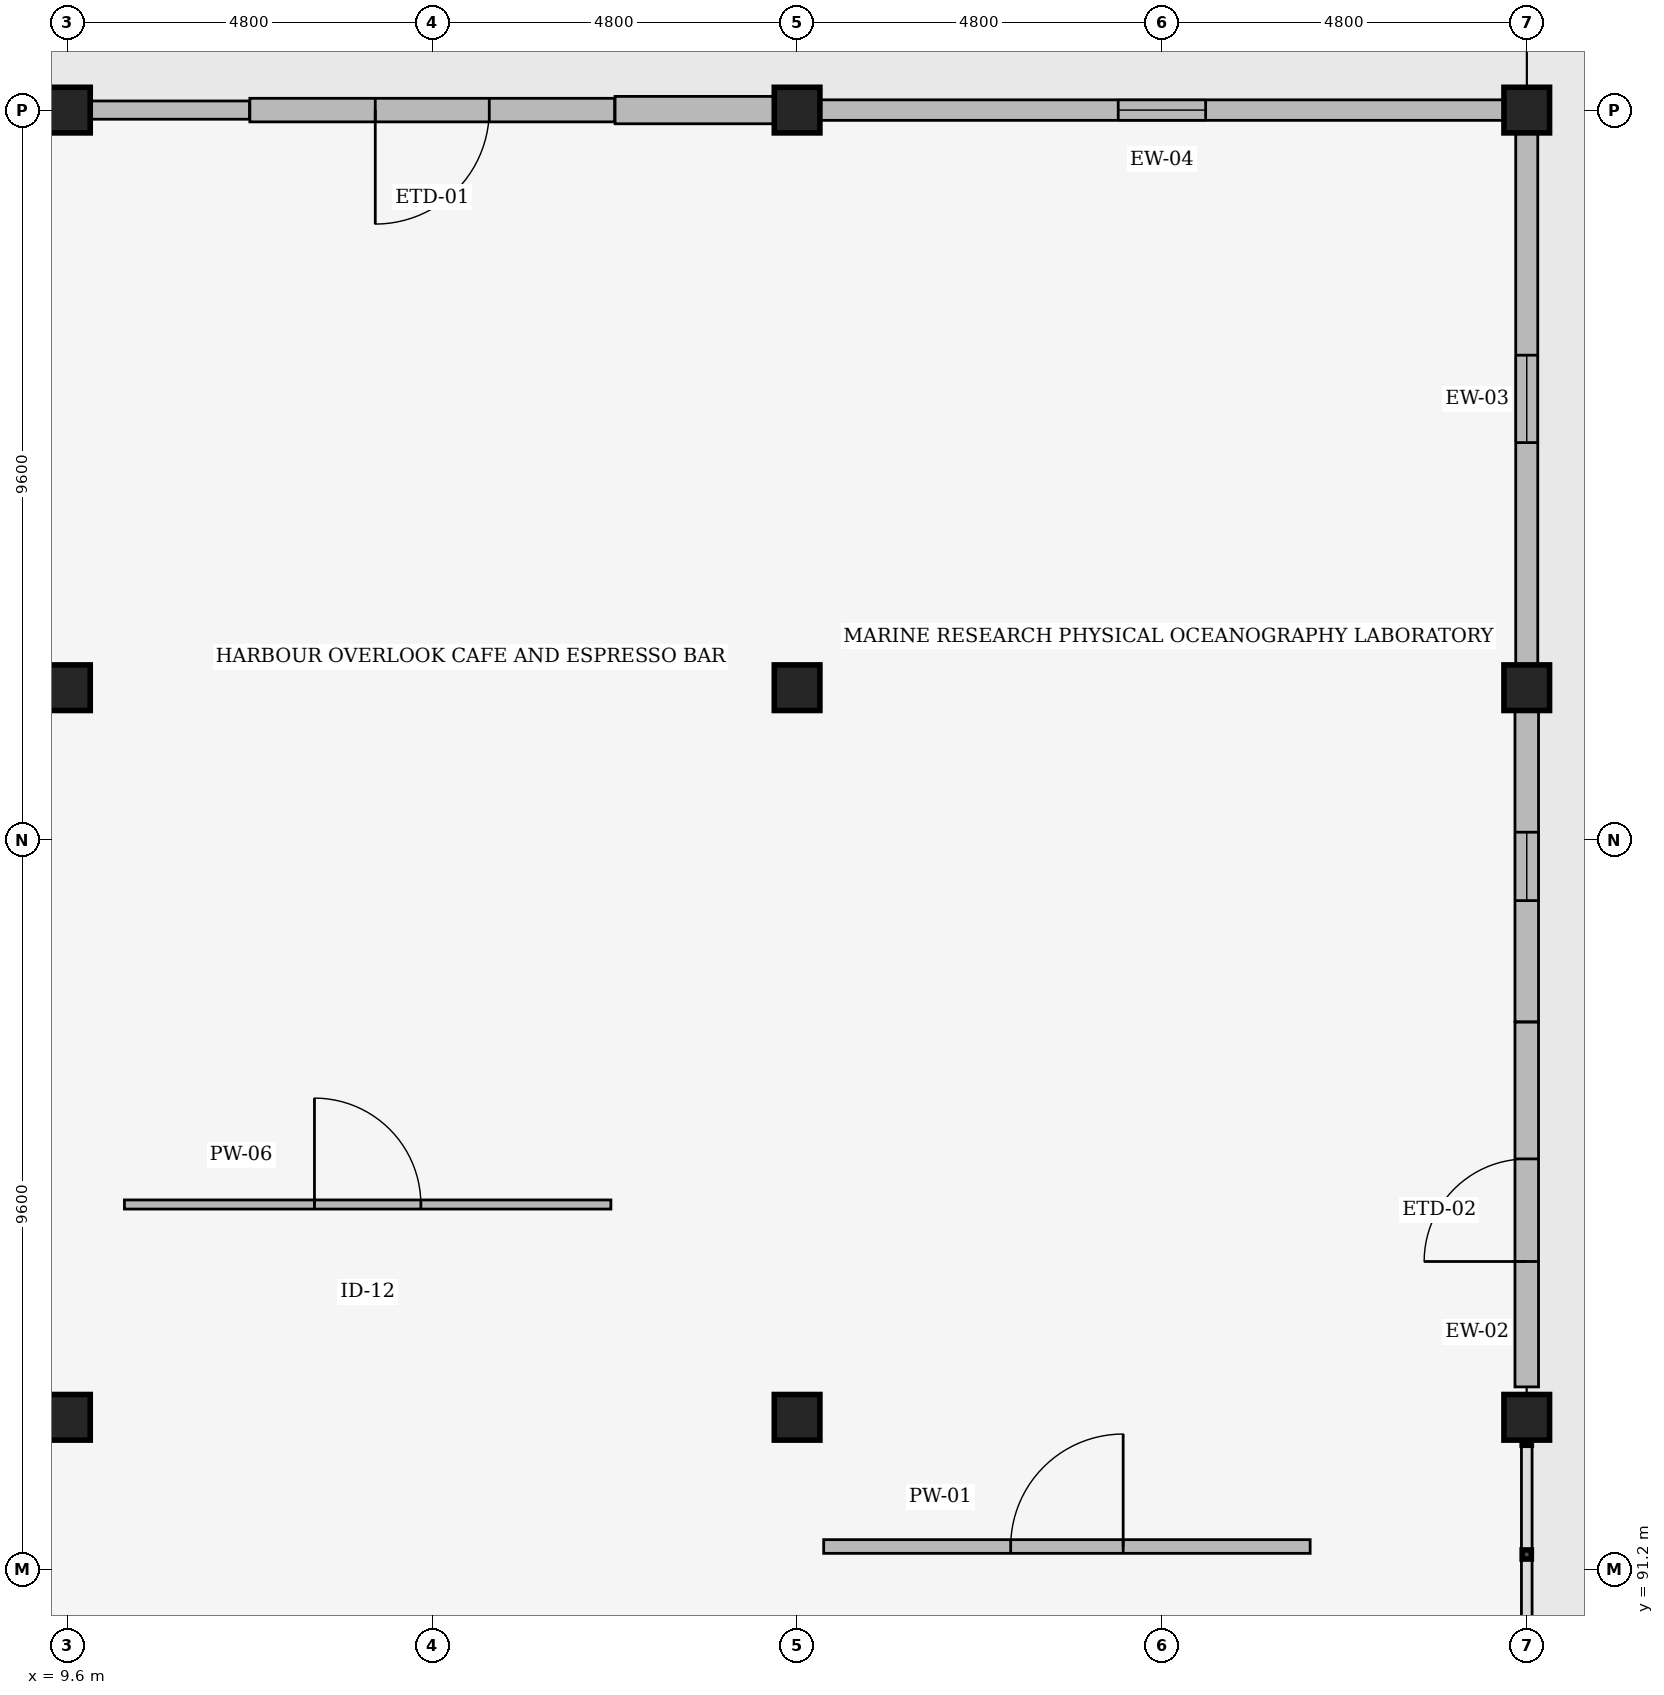
"""IFC4 building model, lengths in metres.
Left out: names, types, materials, properties, quantities, classifications, styles, units other than length and angle.
Written with IfcOpenShell. Run it as: python <this file> out.ifc"""

import sys

from ifc_helpers import new_model, si_unit, direction, frame, frame_2d, origin, origin_2d, place, context, subcontext, project, spatial, rectangle, extrude, element, fill, save


model = new_model("IFC4")
c1 = context("Model", 3, precision=1e-05, world=origin(), true_north=direction((0.0, 1.0)))
c2 = subcontext(c1, "Body", "Model", "MODEL_VIEW")
j1 = project(units=[si_unit("LENGTHUNIT", "METRE"), si_unit("PLANEANGLEUNIT", "RADIAN")], contexts=[c1])
p1 = place(None, origin())
s1 = spatial("IfcSite", under=j1, at=p1, CompositionType="ELEMENT")
p2 = place(p1, origin())
s2 = spatial("IfcBuilding", under=s1, at=p2, CompositionType="ELEMENT")
p3 = place(p2, frame((0.0, 0.0, 10.5)))
s3 = spatial("IfcBuildingStorey", under=s2, at=p3, CompositionType="ELEMENT", Elevation=10.5)
for number, where, z_axis, x_axis in (
    (1, (9.6, 93.2, 0.0), (0.0, 0.0, 1.0), (1.0, 0.0, 0.0)),
    (2, (9.6, 102.8, 0.0), (0.0, 0.0, 1.0), (1.0, 0.0, 0.0)),
    (3, (9.6, 110.4, 0.0), (0.0, 0.0, 1.0), (1.0, 0.0, 0.0)),
    (4, (19.2, 93.2, 0.0), (0.0, 0.0, 1.0), (1.0, 0.0, 0.0)),
    (5, (19.2, 102.8, 0.0), (0.0, 0.0, 1.0), (1.0, 0.0, 0.0)),
    (6, (19.2, 110.4, 0.0), (0.0, 0.0, 1.0), (1.0, 0.0, 0.0)),
    (7, (28.8, 93.2, 0.0), (0.0, 0.0, 1.0), (1.0, 0.0, 0.0)),
    (8, (28.8, 102.8, 0.0), (0.0, 0.0, 1.0), (1.0, 0.0, 0.0)),
    (9, (28.8, 110.4, 0.0), (0.0, 0.0, 1.0), (1.0, 0.0, 0.0)),
):
    element("IfcColumn", number, at=place(p3, frame(where, z_axis=z_axis, x_axis=x_axis)), inside=s3, PredefinedType="COLUMN", context=c2, shape_type="SweptSolid", body=[
        extrude(rectangle(XDim=0.6, YDim=0.6, at=origin_2d()), origin(), (0.0, 0.0, 1.0), 4.8),
    ])
p4 = place(p3, frame((28.8, 93.6, 0.0), z_axis=(0.0, 0.0, 1.0), x_axis=(0.0, 1.0, 0.0)))
e10 = element("IfcWall", 10, at=p4, inside=s3, PredefinedType="SOLIDWALL", context=c2, shape_type="SweptSolid", body=[
    extrude(rectangle(XDim=4.8, YDim=0.31, at=frame_2d((2.4, 0.0))), origin(), (0.0, 0.0, 1.0), 4.178),
])
p5 = place(p4, frame((3.0, 0.0, 0.0), z_axis=(0.0, 0.0, 1.0), x_axis=(-1.0, 0.0, 0.0)))
e11 = element("IfcOpeningElement", 11, at=p5, cuts=e10, PredefinedType="OPENING", context=c2, shape_type="SweptSolid", body=[
    extrude(rectangle(XDim=1.35, YDim=2.2, at=frame_2d((0.675, 1.1))), frame((0.0, 0.165, 0.0), z_axis=(0.0, -1.0, 0.0), x_axis=(1.0, 0.0, 0.0)), (0.0, 0.0, 1.0), 0.33),
])
p6 = place(p3, frame((16.8, 110.4, 0.0), z_axis=(0.0, 0.0, 1.0), x_axis=(-1.0, 0.0, 0.0)))
e12 = element("IfcWall", 12, at=p6, inside=s3, PredefinedType="SOLIDWALL", context=c2, shape_type="SweptSolid", body=[
    extrude(rectangle(XDim=4.8, YDim=0.31, at=frame_2d((2.4, 0.0))), origin(), (0.0, 0.0, 1.0), 4.243),
])
p7 = place(p6, frame((3.15, 0.0, 0.0), z_axis=(0.0, 0.0, 1.0), x_axis=(-1.0, 0.0, 0.0)))
e13 = element("IfcOpeningElement", 13, at=p7, cuts=e12, PredefinedType="OPENING", context=c2, shape_type="SweptSolid", body=[
    extrude(rectangle(XDim=1.5, YDim=2.25, at=frame_2d((0.75, 1.125))), frame((0.0, 0.165, 0.0), z_axis=(0.0, -1.0, 0.0), x_axis=(1.0, 0.0, 0.0)), (0.0, 0.0, 1.0), 0.33),
])
p8 = place(p3, frame((28.8, 98.405, 0.0), z_axis=(0.0, 0.0, 1.0), x_axis=(0.0, 1.0, 0.0)))
e14 = element("IfcWall", 14, at=p8, inside=s3, PredefinedType="SOLIDWALL", context=c2, shape_type="SweptSolid", body=[
    extrude(rectangle(XDim=4.087, YDim=0.31, at=frame_2d((2.043, 0.0))), origin(), (0.0, 0.0, 1.0), 4.178),
])
p9 = place(p8, frame((1.594, 0.0, 0.95)))
e15 = element("IfcOpeningElement", 15, at=p9, cuts=e14, PredefinedType="OPENING", context=c2, shape_type="SweptSolid", body=[
    extrude(rectangle(XDim=0.9, YDim=2.1, at=frame_2d((0.45, 1.05))), frame((0.0, 0.165, 0.0), z_axis=(0.0, -1.0, 0.0), x_axis=(1.0, 0.0, 0.0)), (0.0, 0.0, 1.0), 0.33),
])
p10 = place(p3, frame((28.8, 103.108, 0.0), z_axis=(0.0, 0.0, 1.0), x_axis=(0.0, 1.0, 0.0)))
e16 = element("IfcWall", 16, at=p10, inside=s3, PredefinedType="SOLIDWALL", context=c2, shape_type="SweptSolid", body=[
    extrude(rectangle(XDim=6.984, YDim=0.29, at=frame_2d((3.492, 0.0))), origin(), (0.0, 0.0, 1.0), 4.136),
])
p11 = place(p10, frame((2.917, 0.0, 0.95)))
e17 = element("IfcOpeningElement", 17, at=p11, cuts=e16, PredefinedType="OPENING", context=c2, shape_type="SweptSolid", body=[
    extrude(rectangle(XDim=1.15, YDim=1.2, at=frame_2d((0.575, 0.6))), frame((0.0, 0.155, 0.0), z_axis=(0.0, -1.0, 0.0), x_axis=(1.0, 0.0, 0.0)), (0.0, 0.0, 1.0), 0.31),
])
p12 = place(p3, frame((28.492, 110.4, 0.0), z_axis=(0.0, 0.0, 1.0), x_axis=(-1.0, 0.0, 0.0)))
e18 = element("IfcWall", 18, at=p12, inside=s3, PredefinedType="SOLIDWALL", context=c2, shape_type="SweptSolid", body=[
    extrude(rectangle(XDim=8.984, YDim=0.27, at=frame_2d((4.492, 0.0))), origin(), (0.0, 0.0, 1.0), 4.138),
])
p13 = place(p12, frame((3.917, 0.0, 0.95)))
e19 = element("IfcOpeningElement", 19, at=p13, cuts=e18, PredefinedType="OPENING", context=c2, shape_type="SweptSolid", body=[
    extrude(rectangle(XDim=1.15, YDim=1.5, at=frame_2d((0.575, 0.75))), frame((0.0, 0.145, 0.0), z_axis=(0.0, -1.0, 0.0), x_axis=(1.0, 0.0, 0.0)), (0.0, 0.0, 1.0), 0.29),
])
p14 = place(p3, frame((18.892, 110.4, 0.0), z_axis=(0.0, 0.0, 1.0), x_axis=(-1.0, 0.0, 0.0)))
e20 = element("IfcWall", 20, at=p14, inside=s3, PredefinedType="SOLIDWALL", context=c2, shape_type="SweptSolid", body=[
    extrude(rectangle(XDim=2.087, YDim=0.36, at=frame_2d((1.043, 0.0))), origin(), (0.0, 0.0, 1.0), 4.243),
])
p15 = place(p3, frame((11.995, 110.4, 0.0), z_axis=(0.0, 0.0, 1.0), x_axis=(-1.0, 0.0, 0.0)))
e21 = element("IfcWall", 21, at=p15, inside=s3, PredefinedType="SOLIDWALL", context=c2, shape_type="SweptSolid", body=[
    extrude(rectangle(XDim=2.087, YDim=0.24, at=frame_2d((1.043, 0.0))), origin(), (0.0, 0.0, 1.0), 4.243),
])
p16 = place(p3, frame((10.35, 96.0, 0.0), z_axis=(0.0, 0.0, 1.0), x_axis=(1.0, 0.0, 0.0)))
e22 = element("IfcWall", 22, at=p16, inside=s3, PredefinedType="PARTITIONING", context=c2, shape_type="SweptSolid", body=[
    extrude(rectangle(XDim=6.4, YDim=0.12, at=frame_2d((3.2, 0.0))), origin(), (0.0, 0.0, 1.0), 4.234),
])
p17 = place(p16, frame((2.5, 0.0, 0.0)))
e23 = element("IfcOpeningElement", 23, at=p17, cuts=e22, PredefinedType="OPENING", context=c2, shape_type="SweptSolid", body=[
    extrude(rectangle(XDim=1.4, YDim=2.3, at=frame_2d((0.7, 1.15))), frame((0.0, 0.07, 0.0), z_axis=(0.0, -1.0, 0.0), x_axis=(1.0, 0.0, 0.0)), (0.0, 0.0, 1.0), 0.14),
])
p18 = place(p3, frame((19.55, 91.5, 0.0), z_axis=(0.0, 0.0, 1.0), x_axis=(1.0, 0.0, 0.0)))
e24 = element("IfcWall", 24, at=p18, inside=s3, PredefinedType="PARTITIONING", context=c2, shape_type="SweptSolid", body=[
    extrude(rectangle(XDim=6.4, YDim=0.18, at=frame_2d((3.2, 0.0))), origin(), (0.0, 0.0, 1.0), 4.017),
])
p19 = place(p18, frame((2.46, 0.0, 0.0)))
e25 = element("IfcOpeningElement", 25, at=p19, cuts=e24, PredefinedType="OPENING", context=c2, shape_type="SweptSolid", body=[
    extrude(rectangle(XDim=1.48, YDim=2.3, at=frame_2d((0.74, 1.15))), frame((0.0, 0.1, 0.0), z_axis=(0.0, -1.0, 0.0), x_axis=(1.0, 0.0, 0.0)), (0.0, 0.0, 1.0), 0.2),
])
p20 = place(p5, origin())
e26 = element("IfcDoor", 26, at=p20, inside=s3, OperationType="SINGLE_SWING_RIGHT", PredefinedType="DOOR", context=c2, shape_type="SweptSolid", body=[
    extrude(rectangle(XDim=1.35, YDim=2.2, at=frame_2d((0.675, 1.1))), frame((0.0, 0.025, 0.0), z_axis=(0.0, -1.0, 0.0), x_axis=(1.0, 0.0, 0.0)), (0.0, 0.0, 1.0), 0.05),
])
fill(e11, e26)
p21 = place(p7, origin())
e27 = element("IfcDoor", 27, at=p21, inside=s3, OperationType="SINGLE_SWING_LEFT", PredefinedType="DOOR", context=c2, shape_type="SweptSolid", body=[
    extrude(rectangle(XDim=1.5, YDim=2.25, at=frame_2d((0.75, 1.125))), frame((0.0, 0.025, 0.0), z_axis=(0.0, -1.0, 0.0), x_axis=(1.0, 0.0, 0.0)), (0.0, 0.0, 1.0), 0.05),
])
fill(e13, e27)
p22 = place(p9, origin())
e28 = element("IfcWindow", 28, at=p22, inside=s3, PartitioningType="SINGLE_PANEL", PredefinedType="WINDOW", context=c2, shape_type="SweptSolid", body=[
    extrude(rectangle(XDim=0.9, YDim=2.1, at=frame_2d((0.45, 1.05))), frame((0.0, 0.03, 0.0), z_axis=(0.0, -1.0, 0.0), x_axis=(1.0, 0.0, 0.0)), (0.0, 0.0, 1.0), 0.06),
])
fill(e15, e28)
p23 = place(p11, origin())
e29 = element("IfcWindow", 29, at=p23, inside=s3, PartitioningType="SINGLE_PANEL", PredefinedType="WINDOW", context=c2, shape_type="SweptSolid", body=[
    extrude(rectangle(XDim=1.15, YDim=1.2, at=frame_2d((0.575, 0.6))), frame((0.0, 0.03, 0.0), z_axis=(0.0, -1.0, 0.0), x_axis=(1.0, 0.0, 0.0)), (0.0, 0.0, 1.0), 0.06),
])
fill(e17, e29)
p24 = place(p13, origin())
e30 = element("IfcWindow", 30, at=p24, inside=s3, PartitioningType="SINGLE_PANEL", PredefinedType="WINDOW", context=c2, shape_type="SweptSolid", body=[
    extrude(rectangle(XDim=1.15, YDim=1.5, at=frame_2d((0.575, 0.75))), frame((0.0, 0.03, 0.0), z_axis=(0.0, -1.0, 0.0), x_axis=(1.0, 0.0, 0.0)), (0.0, 0.0, 1.0), 0.06),
])
fill(e19, e30)
p25 = place(p17, origin())
e31 = element("IfcDoor", 31, at=p25, inside=s3, OperationType="SINGLE_SWING_LEFT", PredefinedType="DOOR", context=c2, shape_type="SweptSolid", body=[
    extrude(rectangle(XDim=1.4, YDim=2.3, at=frame_2d((0.7, 1.15))), frame((0.0, 0.025, 0.0), z_axis=(0.0, -1.0, 0.0), x_axis=(1.0, 0.0, 0.0)), (0.0, 0.0, 1.0), 0.05),
])
fill(e23, e31)
p26 = place(p19, origin())
e32 = element("IfcDoor", 32, at=p26, inside=s3, OperationType="SINGLE_SWING_RIGHT", PredefinedType="DOOR", context=c2, shape_type="SweptSolid", body=[
    extrude(rectangle(XDim=1.48, YDim=2.3, at=frame_2d((0.74, 1.15))), frame((0.0, 0.025, 0.0), z_axis=(0.0, -1.0, 0.0), x_axis=(1.0, 0.0, 0.0)), (0.0, 0.0, 1.0), 0.05),
])
fill(e25, e32)
save(model, sys.argv[1])
